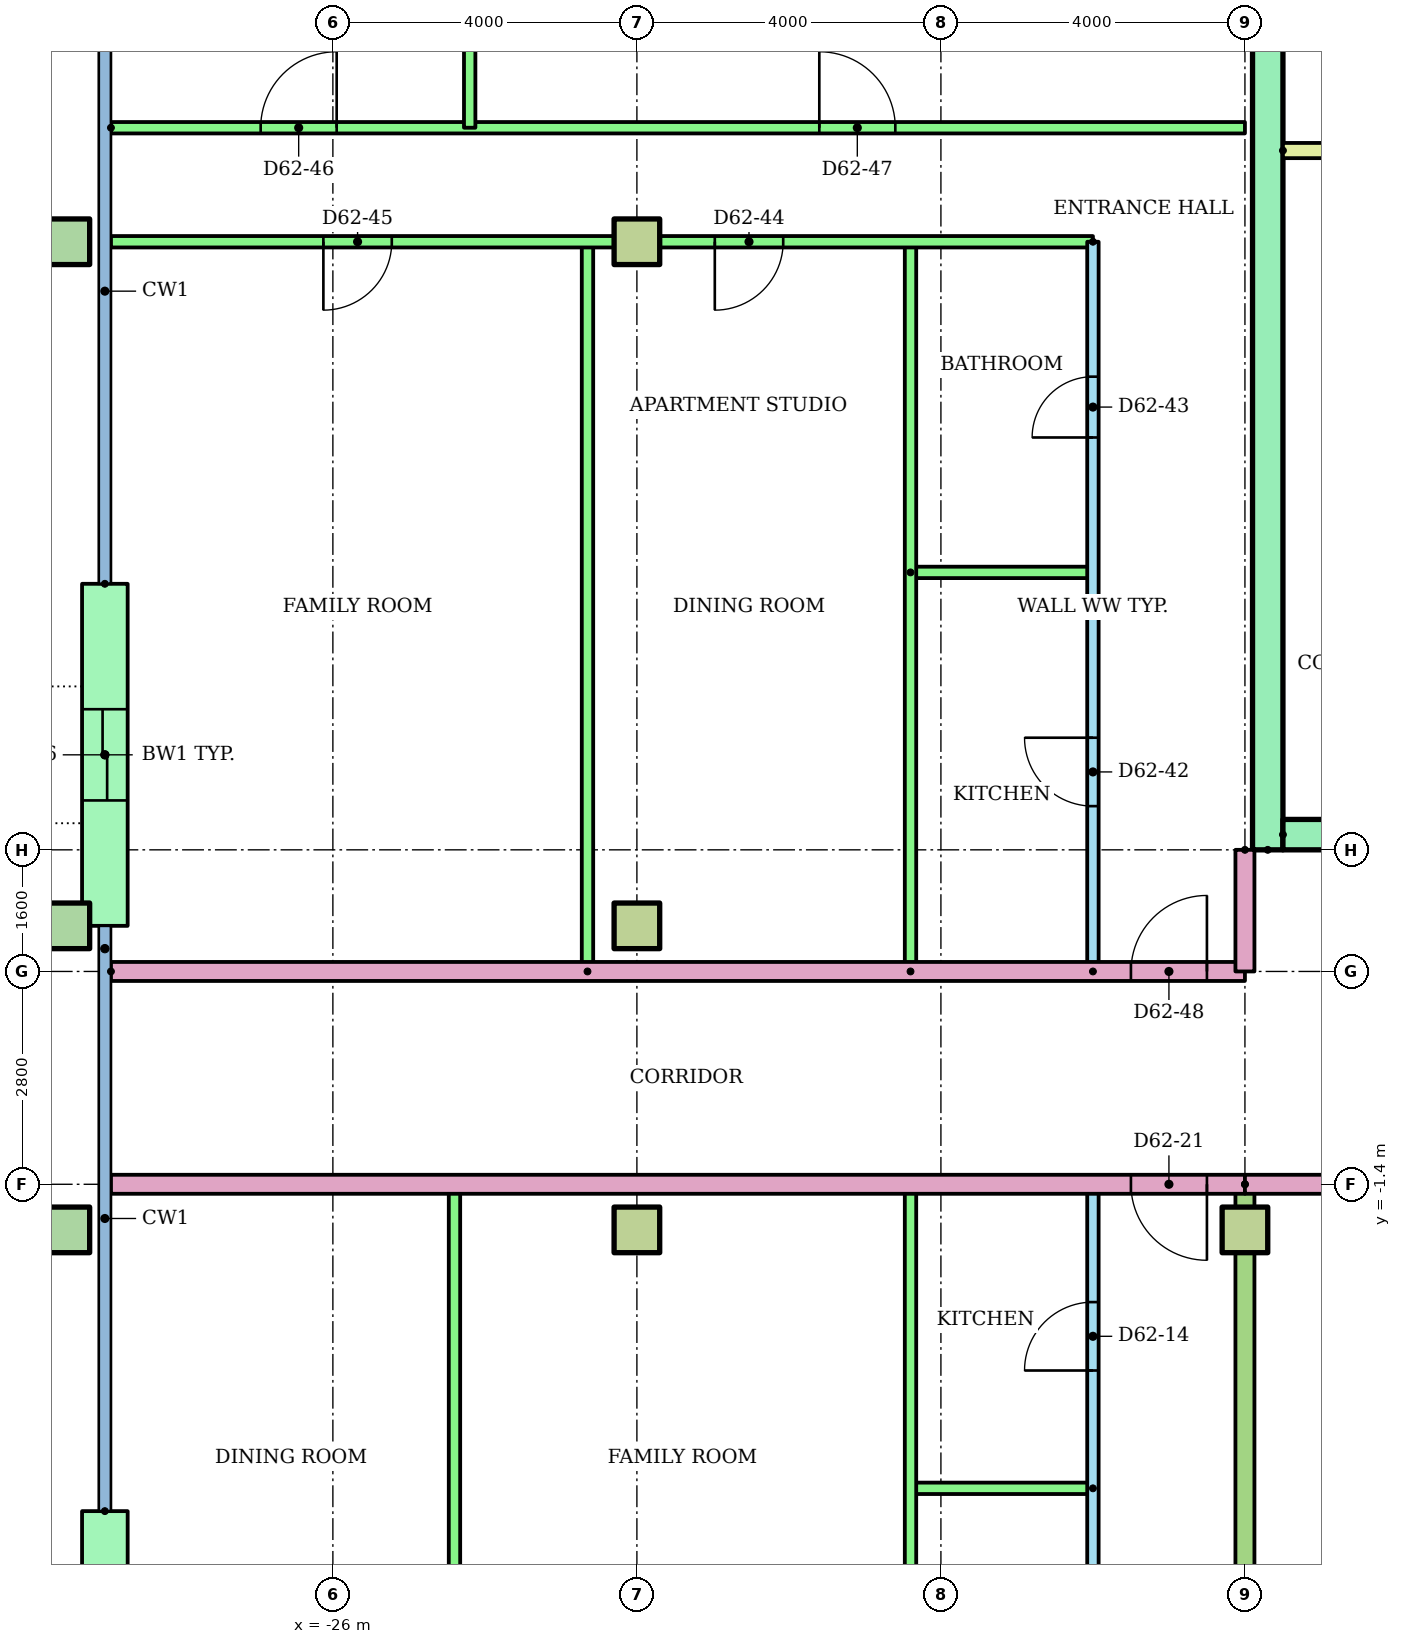
"""IFC4 building model, lengths in metres.
Left out: names, types, materials, properties, quantities, classifications, styles, units other than length and angle.
Written with IfcOpenShell. Run it as: python <this file> out.ifc"""

import sys

from ifc_helpers import new_model, si_unit, direction, frame, frame_2d, origin, origin_2d, place, context, subcontext, project, spatial, rectangle, hollow_rectangle, extrude, element, fill, save


model = new_model("IFC4")
c1 = context("Model", 3, precision=1e-05, world=origin(), true_north=direction((0.0, 1.0)))
c2 = subcontext(c1, "Body", "Model", "MODEL_VIEW")
j1 = project(units=[si_unit("LENGTHUNIT", "METRE"), si_unit("PLANEANGLEUNIT", "RADIAN")], contexts=[c1])
p1 = place(None, origin())
s1 = spatial("IfcSite", under=j1, at=p1, CompositionType="ELEMENT")
p2 = place(p1, origin())
s2 = spatial("IfcBuilding", under=s1, at=p2, CompositionType="ELEMENT")
p3 = place(p2, frame((0.0, 0.0, 236.4)))
s3 = spatial("IfcBuildingStorey", under=s2, at=p3, CompositionType="ELEMENT", Elevation=236.4)
p4 = place(p3, frame((-29.5, -2.0, 0.0)))
e1 = element("IfcColumn", 1, at=p4, inside=s3, PredefinedType="COLUMN", context=c2, shape_type="SweptSolid", body=[
    extrude(hollow_rectangle(XDim=0.6, YDim=0.6, WallThickness=0.03, at=origin_2d()), origin(), (0.0, 0.0, 1.0), 3.2),
])
for number, where in (
    (2, (-22.0, -2.0, 0.0)),
    (3, (-14.0, -2.0, 0.0)),
):
    element("IfcColumn", number, at=place(p3, frame(where)), inside=s3, PredefinedType="COLUMN", context=c2, shape_type="SweptSolid", body=[
        extrude(rectangle(XDim=0.6, YDim=0.6, at=origin_2d()), origin(), (0.0, 0.0, 1.0), 3.2),
    ])
p5 = place(p3, frame((-29.5, 2.0, 0.0)))
e4 = element("IfcColumn", 4, at=p5, inside=s3, PredefinedType="COLUMN", context=c2, shape_type="SweptSolid", body=[
    extrude(hollow_rectangle(XDim=0.6, YDim=0.6, WallThickness=0.03, at=origin_2d()), origin(), (0.0, 0.0, 1.0), 3.2),
])
p6 = place(p3, frame((-22.0, 2.0, 0.0)))
e5 = element("IfcColumn", 5, at=p6, inside=s3, PredefinedType="COLUMN", context=c2, shape_type="SweptSolid", body=[
    extrude(rectangle(XDim=0.6, YDim=0.6, at=origin_2d()), origin(), (0.0, 0.0, 1.0), 3.2),
])
p7 = place(p3, frame((-29.5, 11.0, 0.0)))
e6 = element("IfcColumn", 6, at=p7, inside=s3, PredefinedType="COLUMN", context=c2, shape_type="SweptSolid", body=[
    extrude(hollow_rectangle(XDim=0.6, YDim=0.6, WallThickness=0.03, at=origin_2d()), origin(), (0.0, 0.0, 1.0), 3.2),
])
p8 = place(p3, frame((-22.0, 11.0, 0.0)))
e7 = element("IfcColumn", 7, at=p8, inside=s3, PredefinedType="COLUMN", context=c2, shape_type="SweptSolid", body=[
    extrude(rectangle(XDim=0.6, YDim=0.6, at=origin_2d()), origin(), (0.0, 0.0, 1.0), 3.2),
])
p9 = place(p3, frame((-29.0, 6.5, 0.0), z_axis=(0.0, 0.0, 1.0), x_axis=(0.0, -1.0, 0.0)))
e8 = element("IfcWall", 8, at=p9, inside=s3, PredefinedType="STANDARD", context=c2, shape_type="SweptSolid", body=[
    extrude(rectangle(XDim=4.5, YDim=0.6, at=frame_2d((2.25, 0.0))), origin(), (0.0, 0.0, 1.0), 2.8),
])
p10 = place(p9, frame((1.65, 0.0, 0.0)))
e9 = element("IfcOpeningElement", 9, at=p10, cuts=e8, PredefinedType="OPENING", context=c2, shape_type="SweptSolid", body=[
    extrude(rectangle(XDim=1.2, YDim=2.1, at=frame_2d((0.6, 1.05))), frame((0.0, 0.31, 0.0), z_axis=(0.0, -1.0, 0.0), x_axis=(1.0, 0.0, 0.0)), (0.0, 0.0, 1.0), 0.62),
])
p11 = place(p3, frame((-29.0, -5.7, 0.0), z_axis=(0.0, 0.0, 1.0), x_axis=(0.0, -1.0, 0.0)))
e10 = element("IfcWall", 10, at=p11, inside=s3, PredefinedType="STANDARD", context=c2, shape_type="SweptSolid", body=[
    extrude(rectangle(XDim=3.7, YDim=0.6, at=frame_2d((1.85, 0.0))), origin(), (0.0, 0.0, 1.0), 2.8),
])
p12 = place(p11, frame((1.25, 0.0, 0.0)))
e11 = element("IfcOpeningElement", 11, at=p12, cuts=e10, PredefinedType="OPENING", context=c2, shape_type="SweptSolid", body=[
    extrude(rectangle(XDim=1.2, YDim=2.1, at=frame_2d((0.6, 1.05))), frame((0.0, 0.31, 0.0), z_axis=(0.0, -1.0, 0.0), x_axis=(1.0, 0.0, 0.0)), (0.0, 0.0, 1.0), 0.62),
])
p13 = place(p3, frame((-13.7, 3.0, 0.0), z_axis=(0.0, 0.0, 1.0), x_axis=(0.0, 1.0, 0.0)))
e12 = element("IfcWall", 12, at=p13, inside=s3, PredefinedType="SHEAR", context=c2, shape_type="SweptSolid", body=[
    extrude(rectangle(XDim=17.0, YDim=0.4, at=frame_2d((8.5, 0.0))), origin(), (0.0, 0.0, 1.0), 2.8),
])
p14 = place(p3, frame((-13.5, 3.2, 0.0)))
e13 = element("IfcWall", 13, at=p14, inside=s3, PredefinedType="SHEAR", context=c2, shape_type="SweptSolid", body=[
    extrude(rectangle(XDim=27.0, YDim=0.4, at=frame_2d((13.5, 0.0))), origin(), (0.0, 0.0, 1.0), 2.8),
])
p15 = place(p14, frame((22.083, 0.0, 0.0)))
e14 = element("IfcOpeningElement", 14, at=p15, cuts=e13, PredefinedType="OPENING", context=c2, shape_type="SweptSolid", body=[
    extrude(rectangle(XDim=1.1, YDim=2.1, at=frame_2d((0.55, 1.05))), frame((0.0, 0.21, 0.0), z_axis=(0.0, -1.0, 0.0), x_axis=(1.0, 0.0, 0.0)), (0.0, 0.0, 1.0), 0.42),
])
p16 = place(p14, frame((25.128, 0.0, 0.0)))
e15 = element("IfcOpeningElement", 15, at=p16, cuts=e13, PredefinedType="OPENING", context=c2, shape_type="SweptSolid", body=[
    extrude(rectangle(XDim=1.1, YDim=2.1, at=frame_2d((0.55, 1.05))), frame((0.0, 0.21, 0.0), z_axis=(0.0, -1.0, 0.0), x_axis=(1.0, 0.0, 0.0)), (0.0, 0.0, 1.0), 0.42),
])
p17 = place(p14, frame((12.6, 0.0, 0.0)))
e16 = element("IfcOpeningElement", 16, at=p17, cuts=e13, PredefinedType="OPENING", context=c2, shape_type="SweptSolid", body=[
    extrude(rectangle(XDim=1.8, YDim=2.1, at=frame_2d((0.9, 1.05))), frame((0.0, 0.21, 0.0), z_axis=(0.0, -1.0, 0.0), x_axis=(1.0, 0.0, 0.0)), (0.0, 0.0, 1.0), 0.42),
])
p18 = place(p3, frame((-13.5, 12.2, 0.0)))
e17 = element("IfcWall", 17, at=p18, inside=s3, PredefinedType="PARTITIONING", context=c2, shape_type="SweptSolid", body=[
    extrude(rectangle(XDim=3.9, YDim=0.2, at=frame_2d((1.95, 0.0))), origin(), (0.0, 0.0, 1.0), 2.8),
])
p19 = place(p3, frame((-16.0, -8.6, 0.0), z_axis=(0.0, 0.0, 1.0), x_axis=(0.0, 1.0, 0.0)))
e18 = element("IfcWall", 18, at=p19, inside=s3, PredefinedType="PARTITIONING", context=c2, shape_type="SweptSolid", body=[
    extrude(rectangle(XDim=7.2, YDim=0.15, at=frame_2d((3.6, 0.0))), origin(), (0.0, 0.0, 1.0), 2.4),
])
p20 = place(p19, frame((4.75, 0.0, 0.0)))
e19 = element("IfcOpeningElement", 19, at=p20, cuts=e18, PredefinedType="OPENING", context=c2, shape_type="SweptSolid", body=[
    extrude(rectangle(XDim=0.9, YDim=2.1, at=frame_2d((0.45, 1.05))), frame((0.0, 0.085, 0.0), z_axis=(0.0, -1.0, 0.0), x_axis=(1.0, 0.0, 0.0)), (0.0, 0.0, 1.0), 0.17),
])
p21 = place(p19, frame((1.2, 0.0, 0.0)))
e20 = element("IfcOpeningElement", 20, at=p21, cuts=e18, PredefinedType="OPENING", context=c2, shape_type="SweptSolid", body=[
    extrude(rectangle(XDim=0.8, YDim=2.1, at=frame_2d((0.4, 1.05))), frame((0.0, 0.085, 0.0), z_axis=(0.0, -1.0, 0.0), x_axis=(1.0, 0.0, 0.0)), (0.0, 0.0, 1.0), 0.17),
])
p22 = place(p3, frame((-16.0, -5.4, 0.0), z_axis=(0.0, 0.0, 1.0), x_axis=(-1.0, 0.0, 0.0)))
e21 = element("IfcWall", 21, at=p22, inside=s3, PredefinedType="PARTITIONING", context=c2, shape_type="SweptSolid", body=[
    extrude(rectangle(XDim=2.4, YDim=0.15, at=frame_2d((1.2, 0.0))), origin(), (0.0, 0.0, 1.0), 2.4),
])
for number, where, z_axis, x_axis in (
    (22, (-18.4, -8.6, 0.0), (0.0, 0.0, 1.0), (0.0, 1.0, 0.0)),
    (23, (-24.4, -8.6, 0.0), (0.0, 0.0, 1.0), (0.0, 1.0, 0.0)),
):
    element("IfcWall", number, at=place(p3, frame(where, z_axis=z_axis, x_axis=x_axis)), inside=s3, PredefinedType="PARTITIONING", context=c2, shape_type="SweptSolid", body=[
        extrude(rectangle(XDim=7.2, YDim=0.15, at=frame_2d((3.6, 0.0))), origin(), (0.0, 0.0, 1.0), 2.4),
    ])
p23 = place(p3, frame((-14.0, -1.4, 0.0), z_axis=(0.0, 0.0, 1.0), x_axis=(0.0, -1.0, 0.0)))
e24 = element("IfcWall", 24, at=p23, inside=s3, PredefinedType="PARTITIONING", context=c2, shape_type="SweptSolid", body=[
    extrude(rectangle(XDim=15.11, YDim=0.25, at=frame_2d((7.555, 0.0))), origin(), (0.0, 0.0, 1.0), 2.4),
])
p24 = place(p3, frame((-14.0, -1.4, 0.0), z_axis=(0.0, 0.0, 1.0), x_axis=(-1.0, 0.0, 0.0)))
e25 = element("IfcWall", 25, at=p24, inside=s3, PredefinedType="PARTITIONING", context=c2, shape_type="SweptSolid", body=[
    extrude(rectangle(XDim=14.92, YDim=0.25, at=frame_2d((7.46, 0.0))), origin(), (0.0, 0.0, 1.0), 2.4),
])
p25 = place(p24, frame((0.5, 0.0, 0.0)))
e26 = element("IfcOpeningElement", 26, at=p25, cuts=e25, PredefinedType="OPENING", context=c2, shape_type="SweptSolid", body=[
    extrude(rectangle(XDim=1.0, YDim=2.1, at=frame_2d((0.5, 1.05))), frame((0.0, 0.135, 0.0), z_axis=(0.0, -1.0, 0.0), x_axis=(1.0, 0.0, 0.0)), (0.0, 0.0, 1.0), 0.27),
])
p26 = place(p3, frame((-16.0, 1.4, 0.0), z_axis=(0.0, 0.0, 1.0), x_axis=(0.0, 1.0, 0.0)))
e27 = element("IfcWall", 27, at=p26, inside=s3, PredefinedType="PARTITIONING", context=c2, shape_type="SweptSolid", body=[
    extrude(rectangle(XDim=9.6, YDim=0.15, at=frame_2d((4.8, 0.0))), origin(), (0.0, 0.0, 1.0), 2.4),
])
p27 = place(p26, frame((2.175, 0.0, 0.0)))
e28 = element("IfcOpeningElement", 28, at=p27, cuts=e27, PredefinedType="OPENING", context=c2, shape_type="SweptSolid", body=[
    extrude(rectangle(XDim=0.9, YDim=2.1, at=frame_2d((0.45, 1.05))), frame((0.0, 0.085, 0.0), z_axis=(0.0, -1.0, 0.0), x_axis=(1.0, 0.0, 0.0)), (0.0, 0.0, 1.0), 0.17),
])
p28 = place(p26, frame((7.025, 0.0, 0.0)))
e29 = element("IfcOpeningElement", 29, at=p28, cuts=e27, PredefinedType="OPENING", context=c2, shape_type="SweptSolid", body=[
    extrude(rectangle(XDim=0.8, YDim=2.1, at=frame_2d((0.4, 1.05))), frame((0.0, 0.085, 0.0), z_axis=(0.0, -1.0, 0.0), x_axis=(1.0, 0.0, 0.0)), (0.0, 0.0, 1.0), 0.17),
])
p29 = place(p3, frame((-18.4, 6.65, 0.0)))
e30 = element("IfcWall", 30, at=p29, inside=s3, PredefinedType="PARTITIONING", context=c2, shape_type="SweptSolid", body=[
    extrude(rectangle(XDim=2.4, YDim=0.15, at=frame_2d((1.2, 0.0))), origin(), (0.0, 0.0, 1.0), 2.4),
])
for number, where, z_axis, x_axis in (
    (31, (-18.4, 1.4, 0.0), (0.0, 0.0, 1.0), (0.0, 1.0, 0.0)),
    (32, (-22.65, 1.4, 0.0), (0.0, 0.0, 1.0), (0.0, 1.0, 0.0)),
):
    element("IfcWall", number, at=place(p3, frame(where, z_axis=z_axis, x_axis=x_axis)), inside=s3, PredefinedType="PARTITIONING", context=c2, shape_type="SweptSolid", body=[
        extrude(rectangle(XDim=9.6, YDim=0.15, at=frame_2d((4.8, 0.0))), origin(), (0.0, 0.0, 1.0), 2.4),
    ])
p30 = place(p3, frame((-16.0, 11.0, 0.0), z_axis=(0.0, 0.0, 1.0), x_axis=(-1.0, 0.0, 0.0)))
e33 = element("IfcWall", 33, at=p30, inside=s3, PredefinedType="PARTITIONING", context=c2, shape_type="SweptSolid", body=[
    extrude(rectangle(XDim=12.92, YDim=0.15, at=frame_2d((6.46, 0.0))), origin(), (0.0, 0.0, 1.0), 2.4),
])
p31 = place(p30, frame((4.075, 0.0, 0.0)))
e34 = element("IfcOpeningElement", 34, at=p31, cuts=e33, PredefinedType="OPENING", context=c2, shape_type="SweptSolid", body=[
    extrude(rectangle(XDim=0.9, YDim=2.1, at=frame_2d((0.45, 1.05))), frame((0.0, 0.085, 0.0), z_axis=(0.0, -1.0, 0.0), x_axis=(1.0, 0.0, 0.0)), (0.0, 0.0, 1.0), 0.17),
])
p32 = place(p30, frame((9.225, 0.0, 0.0)))
e35 = element("IfcOpeningElement", 35, at=p32, cuts=e33, PredefinedType="OPENING", context=c2, shape_type="SweptSolid", body=[
    extrude(rectangle(XDim=0.9, YDim=2.1, at=frame_2d((0.45, 1.05))), frame((0.0, 0.085, 0.0), z_axis=(0.0, -1.0, 0.0), x_axis=(1.0, 0.0, 0.0)), (0.0, 0.0, 1.0), 0.17),
])
p33 = place(p3, frame((-28.92, 12.5, 0.0)))
e36 = element("IfcWall", 36, at=p33, inside=s3, PredefinedType="PARTITIONING", context=c2, shape_type="SweptSolid", body=[
    extrude(rectangle(XDim=14.92, YDim=0.15, at=frame_2d((7.46, 0.0))), origin(), (0.0, 0.0, 1.0), 2.4),
])
p34 = place(p33, frame((1.97, 0.0, 0.0)))
e37 = element("IfcOpeningElement", 37, at=p34, cuts=e36, PredefinedType="OPENING", context=c2, shape_type="SweptSolid", body=[
    extrude(rectangle(XDim=1.0, YDim=2.1, at=frame_2d((0.5, 1.05))), frame((0.0, 0.085, 0.0), z_axis=(0.0, -1.0, 0.0), x_axis=(1.0, 0.0, 0.0)), (0.0, 0.0, 1.0), 0.17),
])
p35 = place(p33, frame((9.32, 0.0, 0.0)))
e38 = element("IfcOpeningElement", 38, at=p35, cuts=e36, PredefinedType="OPENING", context=c2, shape_type="SweptSolid", body=[
    extrude(rectangle(XDim=1.0, YDim=2.1, at=frame_2d((0.5, 1.05))), frame((0.0, 0.085, 0.0), z_axis=(0.0, -1.0, 0.0), x_axis=(1.0, 0.0, 0.0)), (0.0, 0.0, 1.0), 0.17),
])
p36 = place(p3, frame((-24.2, 17.12, 0.0), z_axis=(0.0, 0.0, 1.0), x_axis=(0.0, -1.0, 0.0)))
e39 = element("IfcWall", 39, at=p36, inside=s3, PredefinedType="PARTITIONING", context=c2, shape_type="SweptSolid", body=[
    extrude(rectangle(XDim=4.62, YDim=0.15, at=frame_2d((2.31, 0.0))), origin(), (0.0, 0.0, 1.0), 2.4),
])
p37 = place(p3, frame((-28.92, 1.4, 0.0)))
e40 = element("IfcWall", 40, at=p37, inside=s3, PredefinedType="PARTITIONING", context=c2, shape_type="SweptSolid", body=[
    extrude(rectangle(XDim=14.92, YDim=0.25, at=frame_2d((7.46, 0.0))), origin(), (0.0, 0.0, 1.0), 2.4),
])
p38 = place(p37, frame((13.42, 0.0, 0.0)))
e41 = element("IfcOpeningElement", 41, at=p38, cuts=e40, PredefinedType="OPENING", context=c2, shape_type="SweptSolid", body=[
    extrude(rectangle(XDim=1.0, YDim=2.1, at=frame_2d((0.5, 1.05))), frame((0.0, 0.135, 0.0), z_axis=(0.0, -1.0, 0.0), x_axis=(1.0, 0.0, 0.0)), (0.0, 0.0, 1.0), 0.27),
])
p39 = place(p3, frame((14.0, -1.4, 0.0), z_axis=(0.0, 0.0, 1.0), x_axis=(-1.0, 0.0, 0.0)))
e42 = element("IfcWall", 42, at=p39, inside=s3, PredefinedType="PARTITIONING", context=c2, shape_type="SweptSolid", body=[
    extrude(rectangle(XDim=28.0, YDim=0.25, at=frame_2d((14.0, 0.0))), origin(), (0.0, 0.0, 1.0), 2.4),
])
p40 = place(p39, frame((12.5, 0.0, 0.0)))
e43 = element("IfcOpeningElement", 43, at=p40, cuts=e42, PredefinedType="OPENING", context=c2, shape_type="SweptSolid", body=[
    extrude(rectangle(XDim=1.0, YDim=2.1, at=frame_2d((0.5, 1.05))), frame((0.0, 0.135, 0.0), z_axis=(0.0, -1.0, 0.0), x_axis=(1.0, 0.0, 0.0)), (0.0, 0.0, 1.0), 0.27),
])
p41 = place(p39, frame((10.5, 0.0, 0.0)))
e44 = element("IfcOpeningElement", 44, at=p41, cuts=e42, PredefinedType="OPENING", context=c2, shape_type="SweptSolid", body=[
    extrude(rectangle(XDim=1.0, YDim=2.1, at=frame_2d((0.5, 1.05))), frame((0.0, 0.135, 0.0), z_axis=(0.0, -1.0, 0.0), x_axis=(1.0, 0.0, 0.0)), (0.0, 0.0, 1.0), 0.27),
])
p42 = place(p3, frame((-14.0, 3.0, 0.0), z_axis=(0.0, 0.0, 1.0), x_axis=(0.0, -1.0, 0.0)))
e45 = element("IfcWall", 45, at=p42, inside=s3, PredefinedType="PARTITIONING", context=c2, shape_type="SweptSolid", body=[
    extrude(rectangle(XDim=1.6, YDim=0.25, at=frame_2d((0.8, 0.0))), origin(), (0.0, 0.0, 1.0), 2.4),
])
p43 = place(p20, origin())
e46 = element("IfcDoor", 46, at=p43, inside=s3, OperationType="SINGLE_SWING_LEFT", PredefinedType="DOOR", context=c2, shape_type="SweptSolid", body=[
    extrude(rectangle(XDim=0.9, YDim=2.1, at=frame_2d((0.45, 1.05))), frame((0.0, 0.025, 0.0), z_axis=(0.0, -1.0, 0.0), x_axis=(1.0, 0.0, 0.0)), (0.0, 0.0, 1.0), 0.05),
])
fill(e19, e46)
p44 = place(p25, origin())
e47 = element("IfcDoor", 47, at=p44, inside=s3, OperationType="SINGLE_SWING_LEFT", PredefinedType="DOOR", context=c2, shape_type="SweptSolid", body=[
    extrude(rectangle(XDim=1.0, YDim=2.1, at=frame_2d((0.5, 1.05))), frame((0.0, 0.025, 0.0), z_axis=(0.0, -1.0, 0.0), x_axis=(1.0, 0.0, 0.0)), (0.0, 0.0, 1.0), 0.05),
])
fill(e26, e47)
p45 = place(p27, origin())
e48 = element("IfcDoor", 48, at=p45, inside=s3, OperationType="SINGLE_SWING_RIGHT", PredefinedType="DOOR", context=c2, shape_type="SweptSolid", body=[
    extrude(rectangle(XDim=0.9, YDim=2.1, at=frame_2d((0.45, 1.05))), frame((0.0, 0.025, 0.0), z_axis=(0.0, -1.0, 0.0), x_axis=(1.0, 0.0, 0.0)), (0.0, 0.0, 1.0), 0.05),
])
fill(e28, e48)
p46 = place(p28, origin())
e49 = element("IfcDoor", 49, at=p46, inside=s3, OperationType="SINGLE_SWING_LEFT", PredefinedType="DOOR", context=c2, shape_type="SweptSolid", body=[
    extrude(rectangle(XDim=0.8, YDim=2.1, at=frame_2d((0.4, 1.05))), frame((0.0, 0.025, 0.0), z_axis=(0.0, -1.0, 0.0), x_axis=(1.0, 0.0, 0.0)), (0.0, 0.0, 1.0), 0.05),
])
fill(e29, e49)
p47 = place(p31, origin())
e50 = element("IfcDoor", 50, at=p47, inside=s3, OperationType="SINGLE_SWING_RIGHT", PredefinedType="DOOR", context=c2, shape_type="SweptSolid", body=[
    extrude(rectangle(XDim=0.9, YDim=2.1, at=frame_2d((0.45, 1.05))), frame((0.0, 0.025, 0.0), z_axis=(0.0, -1.0, 0.0), x_axis=(1.0, 0.0, 0.0)), (0.0, 0.0, 1.0), 0.05),
])
fill(e34, e50)
p48 = place(p32, origin())
e51 = element("IfcDoor", 51, at=p48, inside=s3, OperationType="SINGLE_SWING_RIGHT", PredefinedType="DOOR", context=c2, shape_type="SweptSolid", body=[
    extrude(rectangle(XDim=0.9, YDim=2.1, at=frame_2d((0.45, 1.05))), frame((0.0, 0.025, 0.0), z_axis=(0.0, -1.0, 0.0), x_axis=(1.0, 0.0, 0.0)), (0.0, 0.0, 1.0), 0.05),
])
fill(e35, e51)
p49 = place(p34, origin())
e52 = element("IfcDoor", 52, at=p49, inside=s3, OperationType="SINGLE_SWING_RIGHT", PredefinedType="DOOR", context=c2, shape_type="SweptSolid", body=[
    extrude(rectangle(XDim=1.0, YDim=2.1, at=frame_2d((0.5, 1.05))), frame((0.0, 0.025, 0.0), z_axis=(0.0, -1.0, 0.0), x_axis=(1.0, 0.0, 0.0)), (0.0, 0.0, 1.0), 0.05),
])
fill(e37, e52)
p50 = place(p35, origin())
e53 = element("IfcDoor", 53, at=p50, inside=s3, OperationType="SINGLE_SWING_LEFT", PredefinedType="DOOR", context=c2, shape_type="SweptSolid", body=[
    extrude(rectangle(XDim=1.0, YDim=2.1, at=frame_2d((0.5, 1.05))), frame((0.0, 0.025, 0.0), z_axis=(0.0, -1.0, 0.0), x_axis=(1.0, 0.0, 0.0)), (0.0, 0.0, 1.0), 0.05),
])
fill(e38, e53)
p51 = place(p38, origin())
e54 = element("IfcDoor", 54, at=p51, inside=s3, OperationType="SINGLE_SWING_RIGHT", PredefinedType="DOOR", context=c2, shape_type="SweptSolid", body=[
    extrude(rectangle(XDim=1.0, YDim=2.1, at=frame_2d((0.5, 1.05))), frame((0.0, 0.025, 0.0), z_axis=(0.0, -1.0, 0.0), x_axis=(1.0, 0.0, 0.0)), (0.0, 0.0, 1.0), 0.05),
])
fill(e41, e54)
p52 = place(p10, origin())
e55 = element("IfcDoor", 55, at=p52, inside=s3, OperationType="SLIDING_TO_LEFT", PredefinedType="DOOR", context=c2, shape_type="SweptSolid", body=[
    extrude(rectangle(XDim=1.2, YDim=2.1, at=frame_2d((0.6, 1.05))), frame((0.0, 0.025, 0.0), z_axis=(0.0, -1.0, 0.0), x_axis=(1.0, 0.0, 0.0)), (0.0, 0.0, 1.0), 0.05),
])
fill(e9, e55)
save(model, sys.argv[1])
